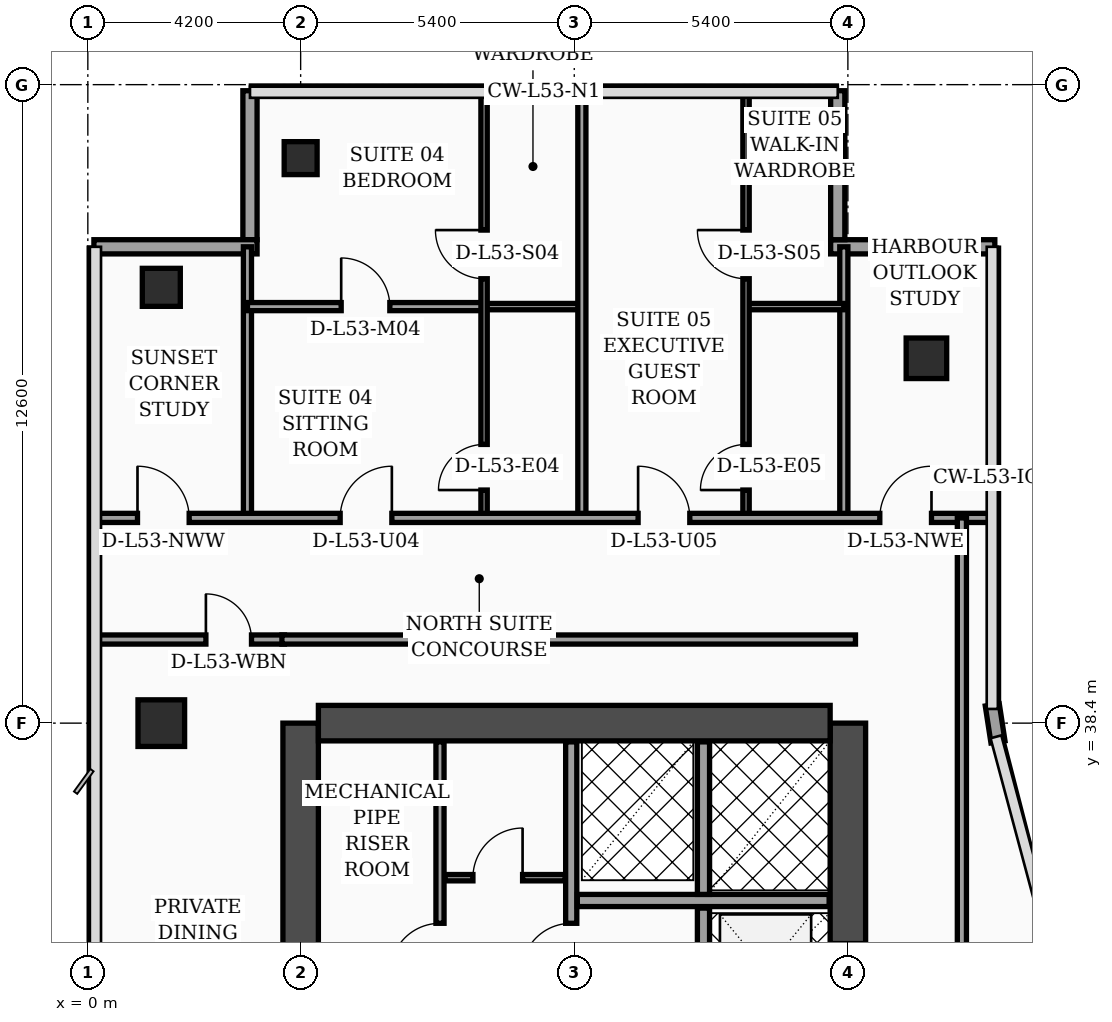
"""IFC4 building model, lengths in metres.
Left out: names, types, materials, properties, quantities, classifications, styles, units other than length and angle.
Written with IfcOpenShell. Run it as: python <this file> out.ifc"""

import sys

from ifc_helpers import new_model, si_unit, direction, frame, frame_2d, origin, origin_2d, place, context, subcontext, project, spatial, rectangle, hollow_rectangle, extrude, element, fill, save


model = new_model("IFC4")
c1 = context("Model", 3, precision=1e-05, world=origin(), true_north=direction((0.0, 1.0)))
c2 = subcontext(c1, "Body", "Model", "MODEL_VIEW")
j1 = project(units=[si_unit("LENGTHUNIT", "METRE"), si_unit("PLANEANGLEUNIT", "RADIAN")], contexts=[c1])
p1 = place(None, origin())
s1 = spatial("IfcSite", under=j1, at=p1, CompositionType="ELEMENT")
p2 = place(p1, origin())
s2 = spatial("IfcBuilding", under=s1, at=p2, CompositionType="ELEMENT")
p3 = place(p2, frame((0.0, 0.0, 214.8)))
s3 = spatial("IfcBuildingStorey", under=s2, at=p3, CompositionType="ELEMENT", Elevation=214.8)
p4 = place(p3, frame((4.2, 16.8, 0.0), z_axis=(0.0, 0.0, 1.0), x_axis=(0.0, 1.0, 0.0)))
e1 = element("IfcWall", 1, at=p4, inside=s3, PredefinedType="SHEAR", context=c2, shape_type="SweptSolid", body=[
    extrude(rectangle(XDim=21.6, YDim=0.7, at=frame_2d((10.8, 0.0))), origin(), (0.0, 0.0, 1.0), 4.05),
])
p5 = place(p3, frame((15.0, 16.8, 0.0), z_axis=(0.0, 0.0, 1.0), x_axis=(0.0, 1.0, 0.0)))
e2 = element("IfcWall", 2, at=p5, inside=s3, PredefinedType="SHEAR", context=c2, shape_type="SweptSolid", body=[
    extrude(rectangle(XDim=21.6, YDim=0.7, at=frame_2d((10.8, 0.0))), origin(), (0.0, 0.0, 1.0), 4.05),
])
p6 = place(p5, frame((8.65, 0.0, 0.0)))
e3 = element("IfcOpeningElement", 3, at=p6, cuts=e2, PredefinedType="OPENING", context=c2, shape_type="SweptSolid", body=[
    extrude(rectangle(XDim=1.1, YDim=2.2, at=frame_2d((0.55, 1.1))), frame((0.0, 0.36, 0.0), z_axis=(0.0, -1.0, 0.0), x_axis=(1.0, 0.0, 0.0)), (0.0, 0.0, 1.0), 0.72),
])
p7 = place(p5, frame((10.85, 0.0, 0.0)))
e4 = element("IfcOpeningElement", 4, at=p7, cuts=e2, PredefinedType="OPENING", context=c2, shape_type="SweptSolid", body=[
    extrude(rectangle(XDim=1.1, YDim=2.2, at=frame_2d((0.55, 1.1))), frame((0.0, 0.36, 0.0), z_axis=(0.0, -1.0, 0.0), x_axis=(1.0, 0.0, 0.0)), (0.0, 0.0, 1.0), 0.72),
])
p8 = place(p5, frame((13.5, 0.0, 0.0)))
e5 = element("IfcOpeningElement", 5, at=p8, cuts=e2, PredefinedType="OPENING", context=c2, shape_type="SweptSolid", body=[
    extrude(rectangle(XDim=1.1, YDim=2.2, at=frame_2d((0.55, 1.1))), frame((0.0, 0.36, 0.0), z_axis=(0.0, -1.0, 0.0), x_axis=(1.0, 0.0, 0.0)), (0.0, 0.0, 1.0), 0.72),
])
p9 = place(p5, frame((16.15, 0.0, 0.0)))
e6 = element("IfcOpeningElement", 6, at=p9, cuts=e2, PredefinedType="OPENING", context=c2, shape_type="SweptSolid", body=[
    extrude(rectangle(XDim=1.1, YDim=2.2, at=frame_2d((0.55, 1.1))), frame((0.0, 0.36, 0.0), z_axis=(0.0, -1.0, 0.0), x_axis=(1.0, 0.0, 0.0)), (0.0, 0.0, 1.0), 0.72),
])
p10 = place(p3, frame((4.55, 38.4, 0.0), z_axis=(0.0, 0.0, 1.0), x_axis=(1.0, 0.0, 0.0)))
e7 = element("IfcWall", 7, at=p10, inside=s3, PredefinedType="SHEAR", context=c2, shape_type="SweptSolid", body=[
    extrude(rectangle(XDim=10.1, YDim=0.7, at=frame_2d((5.05, 0.0))), origin(), (0.0, 0.0, 1.0), 4.05),
])
p11 = place(p3, frame((1.45, 38.4, 0.0), z_axis=(0.0, 0.0, 1.0), x_axis=(1.0, 0.0, 0.0)))
e8 = element("IfcColumn", 8, at=p11, inside=s3, PredefinedType="COLUMN", context=c2, shape_type="SweptSolid", body=[
    extrude(rectangle(XDim=0.92, YDim=0.92, at=origin_2d()), origin(), (0.0, 0.0, 1.0), 4.05),
])
p12 = place(p3, frame((1.45, 47.0, 0.0), z_axis=(0.0, 0.0, 1.0), x_axis=(1.0, 0.0, 0.0)))
e9 = element("IfcColumn", 9, at=p12, inside=s3, PredefinedType="COLUMN", context=c2, shape_type="SweptSolid", body=[
    extrude(hollow_rectangle(XDim=0.75, YDim=0.75, WallThickness=0.032, at=origin_2d()), origin(), (0.0, 0.0, 1.0), 4.05),
])
p13 = place(p3, frame((4.2, 49.55, 0.0), z_axis=(0.0, 0.0, 1.0), x_axis=(1.0, 0.0, 0.0)))
e10 = element("IfcColumn", 10, at=p13, inside=s3, PredefinedType="COLUMN", context=c2, shape_type="SweptSolid", body=[
    extrude(hollow_rectangle(XDim=0.65, YDim=0.65, WallThickness=0.028, at=origin_2d()), origin(), (0.0, 0.0, 1.0), 4.05),
])
p14 = place(p3, frame((16.55, 45.6, 0.0), z_axis=(0.0, 0.0, 1.0), x_axis=(1.0, 0.0, 0.0)))
e11 = element("IfcColumn", 11, at=p14, inside=s3, PredefinedType="COLUMN", context=c2, shape_type="SweptSolid", body=[
    extrude(rectangle(XDim=0.8, YDim=0.8, at=origin_2d()), origin(), (0.0, 0.0, 1.0), 4.05),
])
p15 = place(p3, frame((17.962, 38.03, 0.0), z_axis=(0.0, 0.0, 1.0), x_axis=(-0.15141125477, 0.988470855377, 0.0)))
e12 = element("IfcWall", 12, at=p15, inside=s3, PredefinedType="SOLIDWALL", context=c2, shape_type="SweptSolid", body=[
    extrude(rectangle(XDim=0.739, YDim=0.28, at=frame_2d((0.369, 0.0))), origin(), (0.0, 0.0, 1.0), 4.05),
])
p16 = place(p3, frame((17.9, 47.8, 0.0), z_axis=(0.0, 0.0, 1.0), x_axis=(-1.0, 0.0, 0.0)))
e13 = element("IfcWall", 13, at=p16, inside=s3, PredefinedType="SOLIDWALL", context=c2, shape_type="SweptSolid", body=[
    extrude(rectangle(XDim=3.24, YDim=0.28, at=frame_2d((1.62, 0.0))), origin(), (0.0, 0.0, 1.0), 4.05),
])
p17 = place(p3, frame((14.8, 47.94, 0.0), z_axis=(0.0, 0.0, 1.0), x_axis=(0.0, 1.0, 0.0)))
e14 = element("IfcWall", 14, at=p17, inside=s3, PredefinedType="SOLIDWALL", context=c2, shape_type="SweptSolid", body=[
    extrude(rectangle(XDim=2.94, YDim=0.28, at=frame_2d((1.47, 0.0))), origin(), (0.0, 0.0, 1.0), 4.05),
])
p18 = place(p3, frame((3.2, 50.88, 0.0), z_axis=(0.0, 0.0, 1.0), x_axis=(0.0, -1.0, 0.0)))
e15 = element("IfcWall", 15, at=p18, inside=s3, PredefinedType="SOLIDWALL", context=c2, shape_type="SweptSolid", body=[
    extrude(rectangle(XDim=2.94, YDim=0.28, at=frame_2d((1.47, 0.0))), origin(), (0.0, 0.0, 1.0), 3.6),
])
p19 = place(p3, frame((3.34, 47.8, 0.0), z_axis=(0.0, 0.0, 1.0), x_axis=(-1.0, 0.0, 0.0)))
e16 = element("IfcWall", 16, at=p19, inside=s3, PredefinedType="SOLIDWALL", context=c2, shape_type="SweptSolid", body=[
    extrude(rectangle(XDim=3.22, YDim=0.28, at=frame_2d((1.61, 0.0))), origin(), (0.0, 0.0, 1.0), 3.6),
])
p20 = place(p3, frame((6.95, 32.92, 0.0), z_axis=(0.0, 0.0, 1.0), x_axis=(0.0, 1.0, 0.0)))
e17 = element("IfcWall", 17, at=p20, inside=s3, PredefinedType="PARTITIONING", context=c2, shape_type="SweptSolid", body=[
    extrude(rectangle(XDim=5.11, YDim=0.16, at=frame_2d((2.555, 0.0))), origin(), (0.0, 0.0, 1.0), 4.05),
])
p21 = place(p20, frame((0.55, 0.0, 0.0)))
e18 = element("IfcOpeningElement", 18, at=p21, cuts=e17, PredefinedType="OPENING", context=c2, shape_type="SweptSolid", body=[
    extrude(rectangle(XDim=0.98, YDim=2.15, at=frame_2d((0.49, 1.075))), frame((0.0, 0.09, 0.0), z_axis=(0.0, -1.0, 0.0), x_axis=(1.0, 0.0, 0.0)), (0.0, 0.0, 1.0), 0.18),
])
p22 = place(p3, frame((7.05, 35.35, 0.0), z_axis=(0.0, 0.0, 1.0), x_axis=(1.0, 0.0, 0.0)))
e19 = element("IfcWall", 19, at=p22, inside=s3, PredefinedType="PARTITIONING", context=c2, shape_type="SweptSolid", body=[
    extrude(rectangle(XDim=2.37, YDim=0.125, at=frame_2d((1.185, 0.0))), origin(), (0.0, 0.0, 1.0), 4.05),
])
p23 = place(p22, frame((0.55, 0.0, 0.0)))
e20 = element("IfcOpeningElement", 20, at=p23, cuts=e19, PredefinedType="OPENING", context=c2, shape_type="SweptSolid", body=[
    extrude(rectangle(XDim=0.98, YDim=2.15, at=frame_2d((0.49, 1.075))), frame((0.0, 0.073, 0.0), z_axis=(0.0, -1.0, 0.0), x_axis=(1.0, 0.0, 0.0)), (0.0, 0.0, 1.0), 0.145),
])
p24 = place(p3, frame((9.54, 32.92, 0.0), z_axis=(0.0, 0.0, 1.0), x_axis=(0.0, 1.0, 0.0)))
e21 = element("IfcWall", 21, at=p24, inside=s3, PredefinedType="SOLIDWALL", context=c2, shape_type="SweptSolid", body=[
    extrude(rectangle(XDim=5.11, YDim=0.22, at=frame_2d((2.555, 0.0))), origin(), (0.0, 0.0, 1.0), 4.05),
])
p25 = place(p24, frame((0.55, 0.0, 0.0)))
e22 = element("IfcOpeningElement", 22, at=p25, cuts=e21, PredefinedType="OPENING", context=c2, shape_type="SweptSolid", body=[
    extrude(rectangle(XDim=0.98, YDim=2.15, at=frame_2d((0.49, 1.075))), frame((0.0, 0.12, 0.0), z_axis=(0.0, -1.0, 0.0), x_axis=(1.0, 0.0, 0.0)), (0.0, 0.0, 1.0), 0.24),
])
p26 = place(p3, frame((12.15, 27.0, 0.0), z_axis=(0.0, 0.0, 1.0), x_axis=(0.0, 1.0, 0.0)))
e23 = element("IfcWall", 23, at=p26, inside=s3, PredefinedType="SOLIDWALL", context=c2, shape_type="SweptSolid", body=[
    extrude(rectangle(XDim=7.75, YDim=0.24, at=frame_2d((3.875, 0.0))), origin(), (0.0, 0.0, 1.0), 4.05),
])
p27 = place(p3, frame((9.66, 34.9, 0.0), z_axis=(0.0, 0.0, 1.0), x_axis=(1.0, 0.0, 0.0)))
e24 = element("IfcWall", 24, at=p27, inside=s3, PredefinedType="SOLIDWALL", context=c2, shape_type="SweptSolid", body=[
    extrude(rectangle(XDim=4.97, YDim=0.24, at=frame_2d((2.485, 0.0))), origin(), (0.0, 0.0, 1.0), 4.05),
])
p28 = place(p3, frame((12.15, 35.02, 0.0), z_axis=(0.0, 0.0, 1.0), x_axis=(0.0, 1.0, 0.0)))
e25 = element("IfcWall", 25, at=p28, inside=s3, PredefinedType="SOLIDWALL", context=c2, shape_type="SweptSolid", body=[
    extrude(rectangle(XDim=3.01, YDim=0.24, at=frame_2d((1.505, 0.0))), origin(), (0.0, 0.0, 1.0), 4.05),
])
p29 = place(p3, frame((0.08, 40.05, 0.0), z_axis=(0.0, 0.0, 1.0), x_axis=(1.0, 0.0, 0.0)))
e26 = element("IfcWall", 26, at=p29, inside=s3, PredefinedType="PARTITIONING", context=c2, shape_type="SweptSolid", body=[
    extrude(rectangle(XDim=3.8, YDim=0.18, at=frame_2d((1.9, 0.0))), origin(), (0.0, 0.0, 1.0), 3.45),
])
p30 = place(p29, frame((2.25, 0.0, 0.0)))
e27 = element("IfcOpeningElement", 27, at=p30, cuts=e26, PredefinedType="OPENING", context=c2, shape_type="SweptSolid", body=[
    extrude(rectangle(XDim=0.9, YDim=2.15, at=frame_2d((0.45, 1.075))), frame((0.0, 0.1, 0.0), z_axis=(0.0, -1.0, 0.0), x_axis=(1.0, 0.0, 0.0)), (0.0, 0.0, 1.0), 0.2),
])
p31 = place(p3, frame((3.15, 42.45, 0.0), z_axis=(0.0, 0.0, 1.0), x_axis=(0.0, 1.0, 0.0)))
e28 = element("IfcWall", 28, at=p31, inside=s3, PredefinedType="PARTITIONING", context=c2, shape_type="SweptSolid", body=[
    extrude(rectangle(XDim=5.35, YDim=0.16, at=frame_2d((2.675, 0.0))), origin(), (0.0, 0.0, 1.0), 3.65),
])
p32 = place(p3, frame((14.92, 42.45, 0.0), z_axis=(0.0, 0.0, 1.0), x_axis=(0.0, 1.0, 0.0)))
e29 = element("IfcWall", 29, at=p32, inside=s3, PredefinedType="PARTITIONING", context=c2, shape_type="SweptSolid", body=[
    extrude(rectangle(XDim=5.35, YDim=0.16, at=frame_2d((2.675, 0.0))), origin(), (0.0, 0.0, 1.0), 3.6),
])
p33 = place(p3, frame((7.82, 46.62, 0.0), z_axis=(0.0, 0.0, 1.0), x_axis=(1.0, 0.0, 0.0)))
e30 = element("IfcWall", 30, at=p33, inside=s3, PredefinedType="PARTITIONING", context=c2, shape_type="SweptSolid", body=[
    extrude(rectangle(XDim=1.93, YDim=0.125, at=frame_2d((0.965, 0.0))), origin(), (0.0, 0.0, 1.0), 4.05),
])
p34 = place(p3, frame((3.15, 46.62, 0.0), z_axis=(0.0, 0.0, 1.0), x_axis=(1.0, 0.0, 0.0)))
e31 = element("IfcWall", 31, at=p34, inside=s3, PredefinedType="PARTITIONING", context=c2, shape_type="SweptSolid", body=[
    extrude(rectangle(XDim=4.67, YDim=0.16, at=frame_2d((2.335, 0.0))), origin(), (0.0, 0.0, 1.0), 3.45),
])
p35 = place(p34, frame((1.85, 0.0, 0.0)))
e32 = element("IfcOpeningElement", 32, at=p35, cuts=e31, PredefinedType="OPENING", context=c2, shape_type="SweptSolid", body=[
    extrude(rectangle(XDim=0.96, YDim=2.2, at=frame_2d((0.48, 1.1))), frame((0.0, 0.09, 0.0), z_axis=(0.0, -1.0, 0.0), x_axis=(1.0, 0.0, 0.0)), (0.0, 0.0, 1.0), 0.18),
])
p36 = place(p3, frame((7.82, 42.45, 0.0), z_axis=(0.0, 0.0, 1.0), x_axis=(0.0, 1.0, 0.0)))
e33 = element("IfcWall", 33, at=p36, inside=s3, PredefinedType="PARTITIONING", context=c2, shape_type="SweptSolid", body=[
    extrude(rectangle(XDim=8.49, YDim=0.125, at=frame_2d((4.245, 0.0))), origin(), (0.0, 0.0, 1.0), 3.6),
])
p37 = place(p36, frame((0.55, 0.0, 0.0)))
e34 = element("IfcOpeningElement", 34, at=p37, cuts=e33, PredefinedType="OPENING", context=c2, shape_type="SweptSolid", body=[
    extrude(rectangle(XDim=0.9, YDim=2.15, at=frame_2d((0.45, 1.075))), frame((0.0, 0.073, 0.0), z_axis=(0.0, -1.0, 0.0), x_axis=(1.0, 0.0, 0.0)), (0.0, 0.0, 1.0), 0.145),
])
p38 = place(p36, frame((4.72, 0.0, 0.0)))
e35 = element("IfcOpeningElement", 35, at=p38, cuts=e33, PredefinedType="OPENING", context=c2, shape_type="SweptSolid", body=[
    extrude(rectangle(XDim=0.96, YDim=2.2, at=frame_2d((0.48, 1.1))), frame((0.0, 0.073, 0.0), z_axis=(0.0, -1.0, 0.0), x_axis=(1.0, 0.0, 0.0)), (0.0, 0.0, 1.0), 0.145),
])
p39 = place(p3, frame((12.99, 46.62, 0.0), z_axis=(0.0, 0.0, 1.0), x_axis=(1.0, 0.0, 0.0)))
e36 = element("IfcWall", 36, at=p39, inside=s3, PredefinedType="PARTITIONING", context=c2, shape_type="SweptSolid", body=[
    extrude(rectangle(XDim=1.93, YDim=0.125, at=frame_2d((0.965, 0.0))), origin(), (0.0, 0.0, 1.0), 3.6),
])
p40 = place(p3, frame((12.99, 42.45, 0.0), z_axis=(0.0, 0.0, 1.0), x_axis=(0.0, 1.0, 0.0)))
e37 = element("IfcWall", 37, at=p40, inside=s3, PredefinedType="PARTITIONING", context=c2, shape_type="SweptSolid", body=[
    extrude(rectangle(XDim=8.49, YDim=0.125, at=frame_2d((4.245, 0.0))), origin(), (0.0, 0.0, 1.0), 3.6),
])
p41 = place(p40, frame((0.55, 0.0, 0.0)))
e38 = element("IfcOpeningElement", 38, at=p41, cuts=e37, PredefinedType="OPENING", context=c2, shape_type="SweptSolid", body=[
    extrude(rectangle(XDim=0.9, YDim=2.15, at=frame_2d((0.45, 1.075))), frame((0.0, 0.073, 0.0), z_axis=(0.0, -1.0, 0.0), x_axis=(1.0, 0.0, 0.0)), (0.0, 0.0, 1.0), 0.145),
])
p42 = place(p40, frame((4.72, 0.0, 0.0)))
e39 = element("IfcOpeningElement", 39, at=p42, cuts=e37, PredefinedType="OPENING", context=c2, shape_type="SweptSolid", body=[
    extrude(rectangle(XDim=0.96, YDim=2.2, at=frame_2d((0.48, 1.1))), frame((0.0, 0.073, 0.0), z_axis=(0.0, -1.0, 0.0), x_axis=(1.0, 0.0, 0.0)), (0.0, 0.0, 1.0), 0.145),
])
p43 = place(p3, frame((9.75, 42.45, 0.0), z_axis=(0.0, 0.0, 1.0), x_axis=(0.0, 1.0, 0.0)))
e40 = element("IfcWall", 40, at=p43, inside=s3, PredefinedType="PARTITIONING", context=c2, shape_type="SweptSolid", body=[
    extrude(rectangle(XDim=8.49, YDim=0.16, at=frame_2d((4.245, 0.0))), origin(), (0.0, 0.0, 1.0), 3.6),
])
p44 = place(p3, frame((0.08, 42.45, 0.0), z_axis=(0.0, 0.0, 1.0), x_axis=(1.0, 0.0, 0.0)))
e41 = element("IfcWall", 41, at=p44, inside=s3, PredefinedType="PARTITIONING", context=c2, shape_type="SweptSolid", body=[
    extrude(rectangle(XDim=17.77, YDim=0.18, at=frame_2d((8.885, 0.0))), origin(), (0.0, 0.0, 1.0), 3.45),
])
p45 = place(p44, frame((0.9, 0.0, 0.0)))
e42 = element("IfcOpeningElement", 42, at=p45, cuts=e41, PredefinedType="OPENING", context=c2, shape_type="SweptSolid", body=[
    extrude(rectangle(XDim=1.02, YDim=2.2, at=frame_2d((0.51, 1.1))), frame((0.0, 0.1, 0.0), z_axis=(0.0, -1.0, 0.0), x_axis=(1.0, 0.0, 0.0)), (0.0, 0.0, 1.0), 0.2),
])
p46 = place(p44, frame((4.9, 0.0, 0.0)))
e43 = element("IfcOpeningElement", 43, at=p46, cuts=e41, PredefinedType="OPENING", context=c2, shape_type="SweptSolid", body=[
    extrude(rectangle(XDim=1.02, YDim=2.2, at=frame_2d((0.51, 1.1))), frame((0.0, 0.1, 0.0), z_axis=(0.0, -1.0, 0.0), x_axis=(1.0, 0.0, 0.0)), (0.0, 0.0, 1.0), 0.2),
])
p47 = place(p44, frame((10.78, 0.0, 0.0)))
e44 = element("IfcOpeningElement", 44, at=p47, cuts=e41, PredefinedType="OPENING", context=c2, shape_type="SweptSolid", body=[
    extrude(rectangle(XDim=1.02, YDim=2.2, at=frame_2d((0.51, 1.1))), frame((0.0, 0.1, 0.0), z_axis=(0.0, -1.0, 0.0), x_axis=(1.0, 0.0, 0.0)), (0.0, 0.0, 1.0), 0.2),
])
p48 = place(p44, frame((15.55, 0.0, 0.0)))
e45 = element("IfcOpeningElement", 45, at=p48, cuts=e41, PredefinedType="OPENING", context=c2, shape_type="SweptSolid", body=[
    extrude(rectangle(XDim=1.02, YDim=2.2, at=frame_2d((0.51, 1.1))), frame((0.0, 0.1, 0.0), z_axis=(0.0, -1.0, 0.0), x_axis=(1.0, 0.0, 0.0)), (0.0, 0.0, 1.0), 0.2),
])
p49 = place(p3, frame((17.25, 24.3, 0.0), z_axis=(0.0, 0.0, 1.0), x_axis=(0.0, 1.0, 0.0)))
e46 = element("IfcWall", 46, at=p49, inside=s3, PredefinedType="PARTITIONING", context=c2, shape_type="SweptSolid", body=[
    extrude(rectangle(XDim=18.15, YDim=0.18, at=frame_2d((9.075, 0.0))), origin(), (0.0, 0.0, 1.0), 3.45),
])
p50 = place(p3, frame((3.83, 40.05, 0.0), z_axis=(0.0, 0.0, 1.0), x_axis=(1.0, 0.0, 0.0)))
e47 = element("IfcWall", 47, at=p50, inside=s3, PredefinedType="PARTITIONING", context=c2, shape_type="SweptSolid", body=[
    extrude(rectangle(XDim=11.32, YDim=0.18, at=frame_2d((5.66, 0.0))), origin(), (0.0, 0.0, 1.0), 3.45),
])
p51 = place(p21, origin())
e48 = element("IfcDoor", 48, at=p51, inside=s3, OperationType="SINGLE_SWING_LEFT", PredefinedType="DOOR", context=c2, shape_type="SweptSolid", body=[
    extrude(rectangle(XDim=0.98, YDim=2.15, at=frame_2d((0.49, 1.075))), frame((0.0, 0.025, 0.0), z_axis=(0.0, -1.0, 0.0), x_axis=(1.0, 0.0, 0.0)), (0.0, 0.0, 1.0), 0.05),
])
fill(e18, e48)
p52 = place(p23, origin())
e49 = element("IfcDoor", 49, at=p52, inside=s3, OperationType="SINGLE_SWING_RIGHT", PredefinedType="DOOR", context=c2, shape_type="SweptSolid", body=[
    extrude(rectangle(XDim=0.98, YDim=2.15, at=frame_2d((0.49, 1.075))), frame((0.0, 0.025, 0.0), z_axis=(0.0, -1.0, 0.0), x_axis=(1.0, 0.0, 0.0)), (0.0, 0.0, 1.0), 0.05),
])
fill(e20, e49)
p53 = place(p25, origin())
e50 = element("IfcDoor", 50, at=p53, inside=s3, OperationType="SINGLE_SWING_LEFT", PredefinedType="DOOR", context=c2, shape_type="SweptSolid", body=[
    extrude(rectangle(XDim=0.98, YDim=2.15, at=frame_2d((0.49, 1.075))), frame((0.0, 0.025, 0.0), z_axis=(0.0, -1.0, 0.0), x_axis=(1.0, 0.0, 0.0)), (0.0, 0.0, 1.0), 0.05),
])
fill(e22, e50)
p54 = place(p30, origin())
e51 = element("IfcDoor", 51, at=p54, inside=s3, OperationType="SINGLE_SWING_LEFT", PredefinedType="DOOR", context=c2, shape_type="SweptSolid", body=[
    extrude(rectangle(XDim=0.9, YDim=2.15, at=frame_2d((0.45, 1.075))), frame((0.0, 0.025, 0.0), z_axis=(0.0, -1.0, 0.0), x_axis=(1.0, 0.0, 0.0)), (0.0, 0.0, 1.0), 0.05),
])
fill(e27, e51)
p55 = place(p35, origin())
e52 = element("IfcDoor", 52, at=p55, inside=s3, OperationType="SINGLE_SWING_LEFT", PredefinedType="DOOR", context=c2, shape_type="SweptSolid", body=[
    extrude(rectangle(XDim=0.96, YDim=2.2, at=frame_2d((0.48, 1.1))), frame((0.0, 0.025, 0.0), z_axis=(0.0, -1.0, 0.0), x_axis=(1.0, 0.0, 0.0)), (0.0, 0.0, 1.0), 0.05),
])
fill(e32, e52)
p56 = place(p37, origin())
e53 = element("IfcDoor", 53, at=p56, inside=s3, OperationType="SINGLE_SWING_LEFT", PredefinedType="DOOR", context=c2, shape_type="SweptSolid", body=[
    extrude(rectangle(XDim=0.9, YDim=2.15, at=frame_2d((0.45, 1.075))), frame((0.0, 0.025, 0.0), z_axis=(0.0, -1.0, 0.0), x_axis=(1.0, 0.0, 0.0)), (0.0, 0.0, 1.0), 0.05),
])
fill(e34, e53)
p57 = place(p38, origin())
e54 = element("IfcDoor", 54, at=p57, inside=s3, OperationType="SINGLE_SWING_RIGHT", PredefinedType="DOOR", context=c2, shape_type="SweptSolid", body=[
    extrude(rectangle(XDim=0.96, YDim=2.2, at=frame_2d((0.48, 1.1))), frame((0.0, 0.025, 0.0), z_axis=(0.0, -1.0, 0.0), x_axis=(1.0, 0.0, 0.0)), (0.0, 0.0, 1.0), 0.05),
])
fill(e35, e54)
p58 = place(p41, origin())
e55 = element("IfcDoor", 55, at=p58, inside=s3, OperationType="SINGLE_SWING_LEFT", PredefinedType="DOOR", context=c2, shape_type="SweptSolid", body=[
    extrude(rectangle(XDim=0.9, YDim=2.15, at=frame_2d((0.45, 1.075))), frame((0.0, 0.025, 0.0), z_axis=(0.0, -1.0, 0.0), x_axis=(1.0, 0.0, 0.0)), (0.0, 0.0, 1.0), 0.05),
])
fill(e38, e55)
p59 = place(p42, origin())
e56 = element("IfcDoor", 56, at=p59, inside=s3, OperationType="SINGLE_SWING_RIGHT", PredefinedType="DOOR", context=c2, shape_type="SweptSolid", body=[
    extrude(rectangle(XDim=0.96, YDim=2.2, at=frame_2d((0.48, 1.1))), frame((0.0, 0.025, 0.0), z_axis=(0.0, -1.0, 0.0), x_axis=(1.0, 0.0, 0.0)), (0.0, 0.0, 1.0), 0.05),
])
fill(e39, e56)
p60 = place(p45, origin())
e57 = element("IfcDoor", 57, at=p60, inside=s3, OperationType="SINGLE_SWING_LEFT", PredefinedType="DOOR", context=c2, shape_type="SweptSolid", body=[
    extrude(rectangle(XDim=1.02, YDim=2.2, at=frame_2d((0.51, 1.1))), frame((0.0, 0.025, 0.0), z_axis=(0.0, -1.0, 0.0), x_axis=(1.0, 0.0, 0.0)), (0.0, 0.0, 1.0), 0.05),
])
fill(e42, e57)
p61 = place(p46, origin())
e58 = element("IfcDoor", 58, at=p61, inside=s3, OperationType="SINGLE_SWING_RIGHT", PredefinedType="DOOR", context=c2, shape_type="SweptSolid", body=[
    extrude(rectangle(XDim=1.02, YDim=2.2, at=frame_2d((0.51, 1.1))), frame((0.0, 0.025, 0.0), z_axis=(0.0, -1.0, 0.0), x_axis=(1.0, 0.0, 0.0)), (0.0, 0.0, 1.0), 0.05),
])
fill(e43, e58)
p62 = place(p47, origin())
e59 = element("IfcDoor", 59, at=p62, inside=s3, OperationType="SINGLE_SWING_LEFT", PredefinedType="DOOR", context=c2, shape_type="SweptSolid", body=[
    extrude(rectangle(XDim=1.02, YDim=2.2, at=frame_2d((0.51, 1.1))), frame((0.0, 0.025, 0.0), z_axis=(0.0, -1.0, 0.0), x_axis=(1.0, 0.0, 0.0)), (0.0, 0.0, 1.0), 0.05),
])
fill(e44, e59)
p63 = place(p48, origin())
e60 = element("IfcDoor", 60, at=p63, inside=s3, OperationType="SINGLE_SWING_RIGHT", PredefinedType="DOOR", context=c2, shape_type="SweptSolid", body=[
    extrude(rectangle(XDim=1.02, YDim=2.2, at=frame_2d((0.51, 1.1))), frame((0.0, 0.025, 0.0), z_axis=(0.0, -1.0, 0.0), x_axis=(1.0, 0.0, 0.0)), (0.0, 0.0, 1.0), 0.05),
])
fill(e45, e60)
save(model, sys.argv[1])
